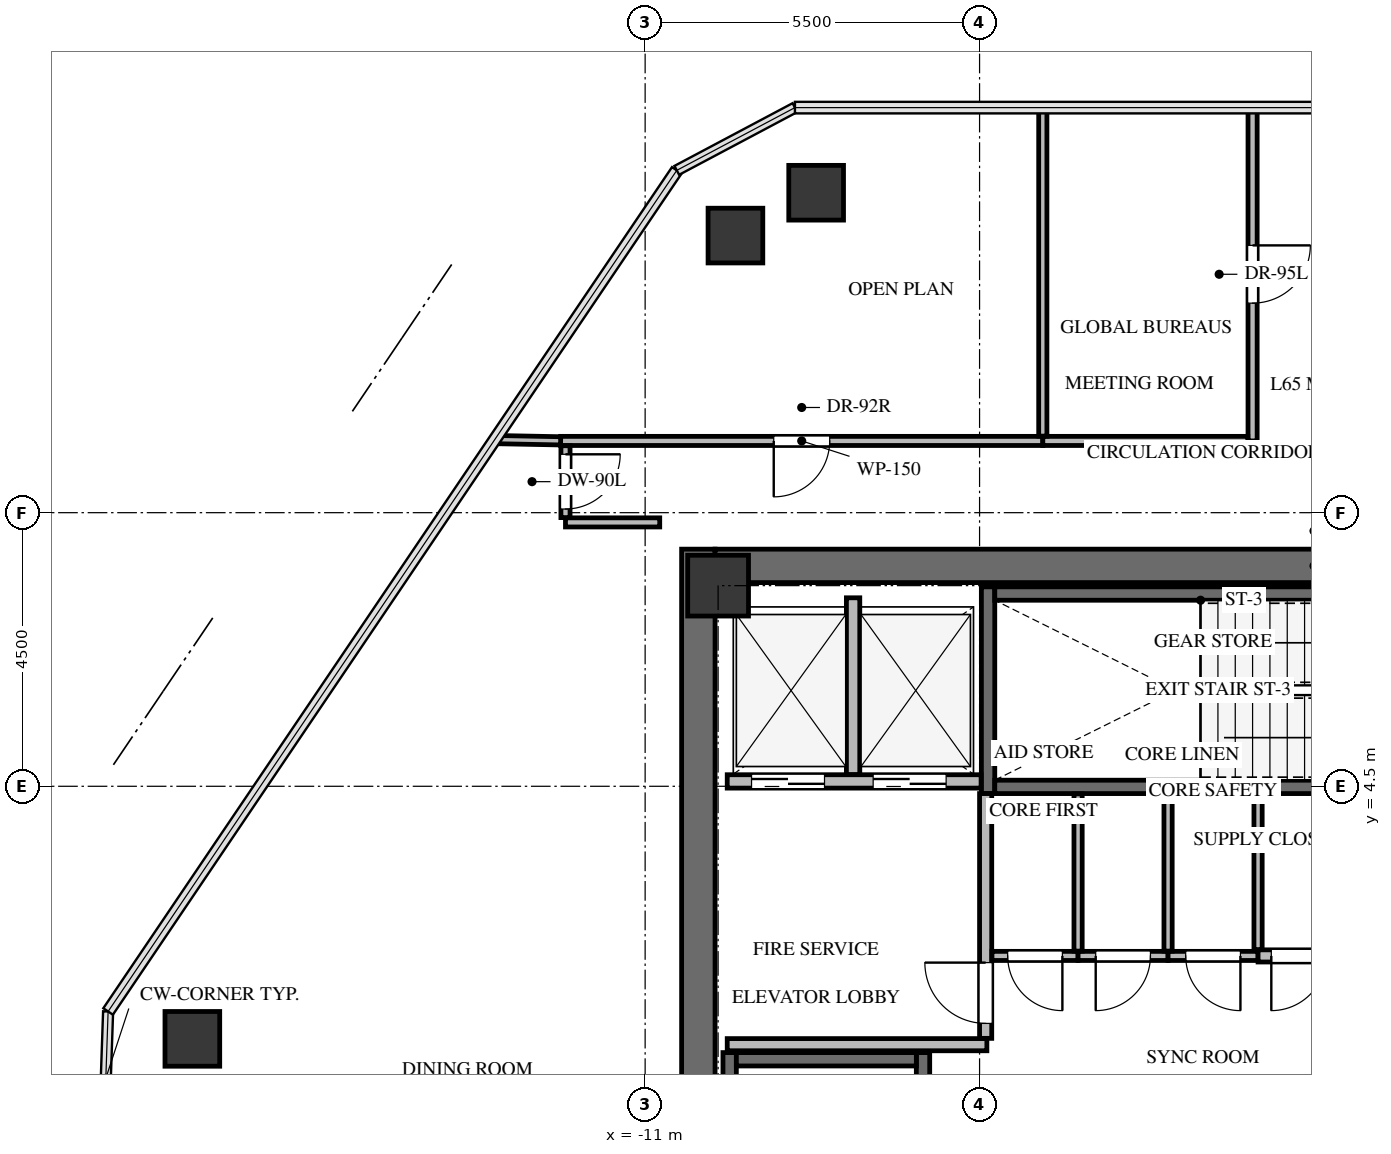
"""IFC4 building model, lengths in metres.
Left out: names, types, materials, properties, quantities, classifications, styles, units other than length and angle.
Written with IfcOpenShell. Run it as: python <this file> out.ifc"""

import sys

from ifc_helpers import new_model, si_unit, direction, frame, frame_2d, origin, origin_2d, place, context, subcontext, project, spatial, rectangle, extrude, source, transform, mapped, element, fill, save


model = new_model("IFC4")
c1 = context("Model", 3, precision=1e-05, world=origin(), true_north=direction((0.0, 1.0)))
c2 = subcontext(c1, "Body", "Model", "MODEL_VIEW")
j1 = project(units=[si_unit("LENGTHUNIT", "METRE"), si_unit("PLANEANGLEUNIT", "RADIAN")], contexts=[c1])
p1 = place(None, origin())
s1 = spatial("IfcSite", under=j1, at=p1, CompositionType="ELEMENT")
p2 = place(p1, origin())
s2 = spatial("IfcBuilding", under=s1, at=p2, CompositionType="ELEMENT")
p3 = place(p2, frame((0.0, 0.0, 234.8)))
s3 = spatial("IfcBuildingStorey", under=s2, at=p3, CompositionType="ELEMENT", Elevation=234.8)
p4 = place(p3, frame((-10.125, -8.4, 0.0), z_axis=(0.0, 0.0, 1.0), x_axis=(0.0, 1.0, 0.0)))
e1 = element("IfcWall", 1, at=p4, inside=s3, PredefinedType="SHEAR", context=c2, shape_type="SweptSolid", body=[
    extrude(rectangle(XDim=16.8, YDim=0.55, at=frame_2d((8.4, 0.0))), origin(), (0.0, 0.0, 1.0), 3.3),
])
p5 = place(p3, frame((-9.85, 8.125, 0.0), z_axis=(0.0, 0.0, 1.0), x_axis=(1.0, 0.0, 0.0)))
e2 = element("IfcWall", 2, at=p5, inside=s3, PredefinedType="SHEAR", context=c2, shape_type="SweptSolid", body=[
    extrude(rectangle(XDim=19.7, YDim=0.55, at=frame_2d((9.85, 0.0))), origin(), (0.0, 0.0, 1.0), 3.3),
])
p6 = place(p3, frame((-6.43, -7.77, -0.24), z_axis=(0.0, 0.0, 1.0), x_axis=(0.0, 1.0, 0.0)))
e3 = element("IfcWall", 3, at=p6, inside=s3, PredefinedType="SHEAR", context=c2, shape_type="SweptSolid", body=[
    extrude(rectangle(XDim=7.89, YDim=0.22, at=frame_2d((3.945, 0.0))), origin(), (0.0, 0.0, 1.0), 3.3),
])
p7 = place(p6, frame((6.32, 0.0, 0.0)))
e4 = element("IfcOpeningElement", 4, at=p7, cuts=e3, PredefinedType="OPENING", context=c2, shape_type="SweptSolid", body=[
    extrude(rectangle(XDim=1.05, YDim=2.15, at=frame_2d((0.525, 1.075))), frame((0.0, 0.12, 0.0), z_axis=(0.0, -1.0, 0.0), x_axis=(1.0, 0.0, 0.0)), (0.0, 0.0, 1.0), 0.24),
])
p8 = place(p3, frame((-9.61, 0.12, -0.24), z_axis=(0.0, 0.0, 1.0), x_axis=(0.0, -1.0, 0.0)))
e5 = element("IfcWall", 5, at=p8, inside=s3, PredefinedType="SHEAR", context=c2, shape_type="SweptSolid", body=[
    extrude(rectangle(XDim=7.89, YDim=0.22, at=frame_2d((3.945, 0.0))), origin(), (0.0, 0.0, 1.0), 3.3),
])
p9 = place(p3, frame((-6.54, 0.01, -0.24), z_axis=(0.0, 0.0, 1.0), x_axis=(-1.0, 0.0, 0.0)))
e6 = element("IfcWall", 6, at=p9, inside=s3, PredefinedType="SHEAR", context=c2, shape_type="SweptSolid", body=[
    extrude(rectangle(XDim=2.96, YDim=0.22, at=frame_2d((1.48, 0.0))), origin(), (0.0, 0.0, 1.0), 3.3),
])
p10 = place(p3, frame((-5.36, 7.78, -0.24), z_axis=(0.0, 0.0, 1.0), x_axis=(0.0, -1.0, 0.0)))
e7 = element("IfcWall", 7, at=p10, inside=s3, PredefinedType="SHEAR", context=c2, shape_type="SweptSolid", body=[
    extrude(rectangle(XDim=3.4, YDim=0.22, at=frame_2d((1.7, 0.0))), origin(), (0.0, 0.0, 1.0), 3.3),
])
p11 = place(p3, frame((-5.25, 4.49, -0.24), z_axis=(0.0, 0.0, 1.0), x_axis=(1.0, 0.0, 0.0)))
e8 = element("IfcWall", 8, at=p11, inside=s3, PredefinedType="SHEAR", context=c2, shape_type="SweptSolid", body=[
    extrude(rectangle(XDim=7.35, YDim=0.22, at=frame_2d((3.675, 0.0))), origin(), (0.0, 0.0, 1.0), 3.3),
])
p12 = place(p11, frame((5.85, 0.0, 0.0)))
e9 = element("IfcOpeningElement", 9, at=p12, cuts=e8, PredefinedType="OPENING", context=c2, shape_type="SweptSolid", body=[
    extrude(rectangle(XDim=1.05, YDim=2.15, at=frame_2d((0.525, 1.075))), frame((0.0, 0.12, 0.0), z_axis=(0.0, -1.0, 0.0), x_axis=(1.0, 0.0, 0.0)), (0.0, 0.0, 1.0), 0.24),
])
p13 = place(p3, frame((2.1, 7.67, -0.24), z_axis=(0.0, 0.0, 1.0), x_axis=(-1.0, 0.0, 0.0)))
e10 = element("IfcWall", 10, at=p13, inside=s3, PredefinedType="SHEAR", context=c2, shape_type="SweptSolid", body=[
    extrude(rectangle(XDim=7.35, YDim=0.22, at=frame_2d((3.675, 0.0))), origin(), (0.0, 0.0, 1.0), 3.3),
])
m1 = source(origin(), c2, "Body", "SweptSolid", [
    extrude(rectangle(XDim=1.0, YDim=1.0, at=origin_2d()), origin(), (0.0, 0.0, 1.0), 3.3),
])
p14 = place(p3, frame((-9.8, 7.8, -0.24), z_axis=(0.0, 0.0, 1.0), x_axis=(1.0, 0.0, 0.0)))
e11 = element("IfcColumn", 11, at=p14, inside=s3, PredefinedType="COLUMN", context=c2, shape_type="MappedRepresentation", body=[
    mapped(m1, transform((0.0, 0.0, 0.0), x_axis=(1.0, 0.0, 0.0), y_axis=(0.0, 1.0, 0.0), z_axis=(0.0, 0.0, 1.0), scale=1.0)),
])
m2 = source(origin(), c2, "Body", "SweptSolid", [
    extrude(rectangle(XDim=0.9, YDim=0.9, at=origin_2d()), origin(), (0.0, 0.0, 1.0), 3.3),
])
for number, where, z_axis, x_axis in (
    (12, (-18.446, 0.346, -0.24), (0.0, 0.0, 1.0), (1.0, 0.0, 0.0)),
    (13, (-9.515, 13.557, -0.24), (0.0, 0.0, 1.0), (1.0, 0.0, 0.0)),
    (14, (-8.188, 14.262, -0.24), (0.0, 0.0, 1.0), (1.0, 0.0, 0.0)),
):
    element("IfcColumn", number, at=place(p3, frame(where, z_axis=z_axis, x_axis=x_axis)), inside=s3, PredefinedType="COLUMN", context=c2, shape_type="MappedRepresentation", body=[
        mapped(m2, transform((0.0, 0.0, 0.0), x_axis=(1.0, 0.0, 0.0), y_axis=(0.0, 1.0, 0.0), z_axis=(0.0, 0.0, 1.0), scale=1.0)),
    ])
p15 = place(p3, frame((-9.65, 4.58, 0.0), z_axis=(0.0, 0.0, 1.0), x_axis=(1.0, 0.0, 0.0)))
e15 = element("IfcWall", 15, at=p15, inside=s3, PredefinedType="SOLIDWALL", context=c2, shape_type="SweptSolid", body=[
    extrude(rectangle(XDim=4.175, YDim=0.22, at=frame_2d((2.087, 0.0))), origin(), (0.0, 0.0, 1.0), 3.045),
])
p16 = place(p15, frame((0.4, 0.0, 0.0)))
e16 = element("IfcOpeningElement", 16, at=p16, cuts=e15, PredefinedType="OPENING", context=c2, shape_type="SweptSolid", body=[
    extrude(rectangle(XDim=1.2, YDim=2.15, at=frame_2d((0.6, 1.075))), frame((0.0, 0.12, 0.0), z_axis=(0.0, -1.0, 0.0), x_axis=(1.0, 0.0, 0.0)), (0.0, 0.0, 1.0), 0.24),
])
p17 = place(p15, frame((2.4, 0.0, 0.0)))
e17 = element("IfcOpeningElement", 17, at=p17, cuts=e15, PredefinedType="OPENING", context=c2, shape_type="SweptSolid", body=[
    extrude(rectangle(XDim=1.2, YDim=2.15, at=frame_2d((0.6, 1.075))), frame((0.0, 0.12, 0.0), z_axis=(0.0, -1.0, 0.0), x_axis=(1.0, 0.0, 0.0)), (0.0, 0.0, 1.0), 0.24),
])
p18 = place(p3, frame((-7.58, 4.694, 0.0), z_axis=(0.0, 0.0, 1.0), x_axis=(0.0, 1.0, 0.0)))
e18 = element("IfcWall", 18, at=p18, inside=s3, PredefinedType="SOLIDWALL", context=c2, shape_type="SweptSolid", body=[
    extrude(rectangle(XDim=2.906, YDim=0.22, at=frame_2d((1.453, 0.0))), origin(), (0.0, 0.0, 1.0), 3.045),
])
p19 = place(p3, frame((-9.65, 0.25, 0.0), z_axis=(0.0, 0.0, 1.0), x_axis=(1.0, 0.0, 0.0)))
e19 = element("IfcWall", 19, at=p19, inside=s3, PredefinedType="SOLIDWALL", context=c2, shape_type="SweptSolid", body=[
    extrude(rectangle(XDim=4.27, YDim=0.2, at=frame_2d((2.135, 0.0))), origin(), (0.0, 0.0, 1.0), 3.045),
])
p20 = place(p3, frame((-5.4, 0.354, 0.0), z_axis=(0.0, 0.0, 1.0), x_axis=(0.0, 1.0, 0.0)))
e20 = element("IfcWall", 20, at=p20, inside=s3, PredefinedType="SOLIDWALL", context=c2, shape_type="SweptSolid", body=[
    extrude(rectangle(XDim=4.026, YDim=0.2, at=frame_2d((2.013, 0.0))), origin(), (0.0, 0.0, 1.0), 3.045),
])
p21 = place(p20, frame((0.246, 0.0, 0.0)))
e21 = element("IfcOpeningElement", 21, at=p21, cuts=e20, PredefinedType="OPENING", context=c2, shape_type="SweptSolid", body=[
    extrude(rectangle(XDim=1.0, YDim=2.15, at=frame_2d((0.5, 1.075))), frame((0.0, 0.11, 0.0), z_axis=(0.0, -1.0, 0.0), x_axis=(1.0, 0.0, 0.0)), (0.0, 0.0, 1.0), 0.22),
])
p22 = place(p3, frame((-3.88, 1.71, 0.0), z_axis=(0.0, 0.0, 1.0), x_axis=(-1.0, 0.0, 0.0)))
e22 = element("IfcWall", 22, at=p22, inside=s3, PredefinedType="PARTITIONING", context=c2, shape_type="SweptSolid", body=[
    extrude(rectangle(XDim=1.416, YDim=0.15, at=frame_2d((0.708, 0.0))), origin(), (0.0, 0.0, 1.0), 3.045),
])
p23 = place(p22, frame((0.258, 0.0, 0.0)))
e23 = element("IfcOpeningElement", 23, at=p23, cuts=e22, PredefinedType="OPENING", context=c2, shape_type="SweptSolid", body=[
    extrude(rectangle(XDim=0.9, YDim=2.05, at=frame_2d((0.45, 1.025))), frame((0.0, 0.085, 0.0), z_axis=(0.0, -1.0, 0.0), x_axis=(1.0, 0.0, 0.0)), (0.0, 0.0, 1.0), 0.17),
])
p24 = place(p3, frame((-2.4, 1.71, 0.0), z_axis=(0.0, 0.0, 1.0), x_axis=(-1.0, 0.0, 0.0)))
e24 = element("IfcWall", 24, at=p24, inside=s3, PredefinedType="PARTITIONING", context=c2, shape_type="SweptSolid", body=[
    extrude(rectangle(XDim=1.48, YDim=0.15, at=frame_2d((0.74, 0.0))), origin(), (0.0, 0.0, 1.0), 3.045),
])
p25 = place(p24, frame((0.29, 0.0, 0.0)))
e25 = element("IfcOpeningElement", 25, at=p25, cuts=e24, PredefinedType="OPENING", context=c2, shape_type="SweptSolid", body=[
    extrude(rectangle(XDim=0.9, YDim=2.05, at=frame_2d((0.45, 1.025))), frame((0.0, 0.085, 0.0), z_axis=(0.0, -1.0, 0.0), x_axis=(1.0, 0.0, 0.0)), (0.0, 0.0, 1.0), 0.17),
])
p26 = place(p3, frame((-0.92, 1.71, 0.0), z_axis=(0.0, 0.0, 1.0), x_axis=(-1.0, 0.0, 0.0)))
e26 = element("IfcWall", 26, at=p26, inside=s3, PredefinedType="PARTITIONING", context=c2, shape_type="SweptSolid", body=[
    extrude(rectangle(XDim=1.48, YDim=0.15, at=frame_2d((0.74, 0.0))), origin(), (0.0, 0.0, 1.0), 3.045),
])
p27 = place(p26, frame((0.29, 0.0, 0.0)))
e27 = element("IfcOpeningElement", 27, at=p27, cuts=e26, PredefinedType="OPENING", context=c2, shape_type="SweptSolid", body=[
    extrude(rectangle(XDim=0.9, YDim=2.05, at=frame_2d((0.45, 1.025))), frame((0.0, 0.085, 0.0), z_axis=(0.0, -1.0, 0.0), x_axis=(1.0, 0.0, 0.0)), (0.0, 0.0, 1.0), 0.17),
])
p28 = place(p3, frame((0.416, 1.71, 0.0), z_axis=(0.0, 0.0, 1.0), x_axis=(-1.0, 0.0, 0.0)))
e28 = element("IfcWall", 28, at=p28, inside=s3, PredefinedType="SOLIDWALL", context=c2, shape_type="SweptSolid", body=[
    extrude(rectangle(XDim=1.336, YDim=0.2, at=frame_2d((0.668, 0.0))), origin(), (0.0, 0.0, 1.0), 3.045),
])
p29 = place(p28, frame((0.218, 0.0, 0.0)))
e29 = element("IfcOpeningElement", 29, at=p29, cuts=e28, PredefinedType="OPENING", context=c2, shape_type="SweptSolid", body=[
    extrude(rectangle(XDim=0.9, YDim=2.05, at=frame_2d((0.45, 1.025))), frame((0.0, 0.11, 0.0), z_axis=(0.0, -1.0, 0.0), x_axis=(1.0, 0.0, 0.0)), (0.0, 0.0, 1.0), 0.22),
])
p30 = place(p3, frame((-4.46, 10.18, 0.0), z_axis=(0.0, 0.0, 1.0), x_axis=(-1.0, 0.0, 0.0)))
e30 = element("IfcWall", 30, at=p30, inside=s3, PredefinedType="PARTITIONING", context=c2, shape_type="SweptSolid", body=[
    extrude(rectangle(XDim=7.93, YDim=0.15, at=frame_2d((3.965, 0.0))), origin(), (0.0, 0.0, 1.0), 2.301),
])
p31 = place(p30, frame((3.505, 0.0, 0.0)))
e31 = element("IfcOpeningElement", 31, at=p31, cuts=e30, PredefinedType="OPENING", context=c2, shape_type="SweptSolid", body=[
    extrude(rectangle(XDim=0.92, YDim=2.1, at=frame_2d((0.46, 1.05))), frame((0.0, 0.085, 0.0), z_axis=(0.0, -1.0, 0.0), x_axis=(1.0, 0.0, 0.0)), (0.0, 0.0, 1.0), 0.17),
])
p32 = place(p3, frame((-1.01, 15.662, 0.0), z_axis=(0.0, 0.0, 1.0), x_axis=(0.0, -1.0, 0.0)))
e32 = element("IfcWall", 32, at=p32, inside=s3, PredefinedType="PARTITIONING", context=c2, shape_type="SweptSolid", body=[
    extrude(rectangle(XDim=5.482, YDim=0.15, at=frame_2d((2.741, 0.0))), origin(), (0.0, 0.0, 1.0), 2.399),
])
p33 = place(p32, frame((2.266, 0.0, 0.0)))
e33 = element("IfcOpeningElement", 33, at=p33, cuts=e32, PredefinedType="OPENING", context=c2, shape_type="SweptSolid", body=[
    extrude(rectangle(XDim=0.95, YDim=2.1, at=frame_2d((0.475, 1.05))), frame((0.0, 0.085, 0.0), z_axis=(0.0, -1.0, 0.0), x_axis=(1.0, 0.0, 0.0)), (0.0, 0.0, 1.0), 0.17),
])
p34 = place(p3, frame((-1.089, 10.18, 0.0), z_axis=(0.0, 0.0, 1.0), x_axis=(-1.0, 0.0, 0.0)))
e34 = element("IfcWall", 34, at=p34, inside=s3, PredefinedType="PARTITIONING", context=c2, shape_type="SweptSolid", body=[
    extrude(rectangle(XDim=3.371, YDim=0.15, at=frame_2d((1.686, 0.0))), origin(), (0.0, 0.0, 1.0), 3.045),
])
p35 = place(p3, frame((-12.31, 8.84, 0.0), z_axis=(0.0, 0.0, 1.0), x_axis=(1.0, 0.0, 0.0)))
e35 = element("IfcWall", 35, at=p35, inside=s3, PredefinedType="PARTITIONING", context=c2, shape_type="SweptSolid", body=[
    extrude(rectangle(XDim=1.55, YDim=0.15, at=frame_2d((0.775, 0.0))), origin(), (0.0, 0.0, 1.0), 3.045),
])
p36 = place(p3, frame((-12.31, 10.101, 0.0), z_axis=(0.0, 0.0, 1.0), x_axis=(0.0, -1.0, 0.0)))
e36 = element("IfcWall", 36, at=p36, inside=s3, PredefinedType="PARTITIONING", context=c2, shape_type="SweptSolid", body=[
    extrude(rectangle(XDim=1.182, YDim=0.15, at=frame_2d((0.591, 0.0))), origin(), (0.0, 0.0, 1.0), 2.399),
])
p37 = place(p36, frame((0.141, 0.0, 0.0)))
e37 = element("IfcOpeningElement", 37, at=p37, cuts=e36, PredefinedType="OPENING", context=c2, shape_type="SweptSolid", body=[
    extrude(rectangle(XDim=0.9, YDim=2.05, at=frame_2d((0.45, 1.025))), frame((0.0, 0.085, 0.0), z_axis=(0.0, -1.0, 0.0), x_axis=(1.0, 0.0, 0.0)), (0.0, 0.0, 1.0), 0.17),
])
for number, where, z_axis, x_axis in (
    (38, (-3.88, 4.375, 0.0), (0.0, 0.0, 1.0), (0.0, -1.0, 0.0)),
    (39, (-2.4, 4.375, 0.0), (0.0, 0.0, 1.0), (0.0, -1.0, 0.0)),
):
    element("IfcWall", number, at=place(p3, frame(where, z_axis=z_axis, x_axis=x_axis)), inside=s3, PredefinedType="PARTITIONING", context=c2, shape_type="SweptSolid", body=[
        extrude(rectangle(XDim=2.586, YDim=0.135, at=frame_2d((1.293, 0.0))), origin(), (0.0, 0.0, 1.0), 3.045),
    ])
p38 = place(p3, frame((-0.92, 4.375, 0.0), z_axis=(0.0, 0.0, 1.0), x_axis=(0.0, -1.0, 0.0)))
e40 = element("IfcWall", 40, at=p38, inside=s3, PredefinedType="PARTITIONING", context=c2, shape_type="SweptSolid", body=[
    extrude(rectangle(XDim=2.561, YDim=0.135, at=frame_2d((1.281, 0.0))), origin(), (0.0, 0.0, 1.0), 3.045),
])
p39 = place(p3, frame((-4.46, 15.662, 0.0), z_axis=(0.0, 0.0, 1.0), x_axis=(0.0, -1.0, 0.0)))
e41 = element("IfcWall", 41, at=p39, inside=s3, PredefinedType="PARTITIONING", context=c2, shape_type="SweptSolid", body=[
    extrude(rectangle(XDim=5.403, YDim=0.135, at=frame_2d((2.702, 0.0))), origin(), (0.0, 0.0, 1.0), 2.399),
])
p40 = place(p3, frame((-12.39, 10.181, 0.0), z_axis=(0.0, 0.0, 1.0), x_axis=(-0.999812128272, 0.019383192748, 0.0)))
e42 = element("IfcWall", 42, at=p40, inside=s3, PredefinedType="PARTITIONING", context=c2, shape_type="SweptSolid", body=[
    extrude(rectangle(XDim=1.083, YDim=0.135, at=frame_2d((0.542, 0.0))), origin(), (0.0, 0.0, 1.0), 3.045),
])
m3 = source(origin(), c2, "Body", "SweptSolid", [
    extrude(rectangle(XDim=1.2, YDim=2.15, at=frame_2d((0.6, 1.075))), frame((0.0, 0.025, 0.0), z_axis=(0.0, -1.0, 0.0), x_axis=(1.0, 0.0, 0.0)), (0.0, 0.0, 1.0), 0.05),
])
p41 = place(p16, origin())
e43 = element("IfcDoor", 43, at=p41, inside=s3, OperationType="DOUBLE_DOOR_SLIDING", PredefinedType="DOOR", context=c2, shape_type="MappedRepresentation", body=[
    mapped(m3, transform((0.0, 0.0, 0.0), x_axis=(1.0, 0.0, 0.0), y_axis=(0.0, 1.0, 0.0), z_axis=(0.0, 0.0, 1.0), scale=1.0)),
])
fill(e16, e43)
p42 = place(p17, origin())
e44 = element("IfcDoor", 44, at=p42, inside=s3, OperationType="DOUBLE_DOOR_SLIDING", PredefinedType="DOOR", context=c2, shape_type="MappedRepresentation", body=[
    mapped(m3, transform((0.0, 0.0, 0.0), x_axis=(1.0, 0.0, 0.0), y_axis=(0.0, 1.0, 0.0), z_axis=(0.0, 0.0, 1.0), scale=1.0)),
])
fill(e17, e44)
m4 = source(origin(), c2, "Body", "SweptSolid", [
    extrude(rectangle(XDim=1.0, YDim=2.15, at=frame_2d((0.5, 1.075))), frame((0.0, 0.025, 0.0), z_axis=(0.0, -1.0, 0.0), x_axis=(1.0, 0.0, 0.0)), (0.0, 0.0, 1.0), 0.05),
])
p43 = place(p21, origin())
e45 = element("IfcDoor", 45, at=p43, inside=s3, OperationType="SINGLE_SWING_RIGHT", PredefinedType="DOOR", context=c2, shape_type="MappedRepresentation", body=[
    mapped(m4, transform((0.0, 0.0, 0.0), x_axis=(1.0, 0.0, 0.0), y_axis=(0.0, 1.0, 0.0), z_axis=(0.0, 0.0, 1.0), scale=1.0)),
])
fill(e21, e45)
m5 = source(origin(), c2, "Body", "SweptSolid", [
    extrude(rectangle(XDim=0.9, YDim=2.05, at=frame_2d((0.45, 1.025))), frame((0.0, 0.025, 0.0), z_axis=(0.0, -1.0, 0.0), x_axis=(1.0, 0.0, 0.0)), (0.0, 0.0, 1.0), 0.05),
])
p44 = place(p23, origin())
e46 = element("IfcDoor", 46, at=p44, inside=s3, OperationType="SINGLE_SWING_LEFT", PredefinedType="DOOR", context=c2, shape_type="MappedRepresentation", body=[
    mapped(m5, transform((0.0, 0.0, 0.0), x_axis=(1.0, 0.0, 0.0), y_axis=(0.0, 1.0, 0.0), z_axis=(0.0, 0.0, 1.0), scale=1.0)),
])
fill(e23, e46)
m6 = source(origin(), c2, "Body", "SweptSolid", [
    extrude(rectangle(XDim=0.9, YDim=2.05, at=frame_2d((0.45, 1.025))), frame((0.0, 0.025, 0.0), z_axis=(0.0, -1.0, 0.0), x_axis=(1.0, 0.0, 0.0)), (0.0, 0.0, 1.0), 0.05),
])
p45 = place(p25, origin())
e47 = element("IfcDoor", 47, at=p45, inside=s3, OperationType="SINGLE_SWING_RIGHT", PredefinedType="DOOR", context=c2, shape_type="MappedRepresentation", body=[
    mapped(m6, transform((0.0, 0.0, 0.0), x_axis=(1.0, 0.0, 0.0), y_axis=(0.0, 1.0, 0.0), z_axis=(0.0, 0.0, 1.0), scale=1.0)),
])
fill(e25, e47)
p46 = place(p27, origin())
e48 = element("IfcDoor", 48, at=p46, inside=s3, OperationType="SINGLE_SWING_LEFT", PredefinedType="DOOR", context=c2, shape_type="MappedRepresentation", body=[
    mapped(m5, transform((0.0, 0.0, 0.0), x_axis=(1.0, 0.0, 0.0), y_axis=(0.0, 1.0, 0.0), z_axis=(0.0, 0.0, 1.0), scale=1.0)),
])
fill(e27, e48)
p47 = place(p29, origin())
e49 = element("IfcDoor", 49, at=p47, inside=s3, OperationType="SINGLE_SWING_RIGHT", PredefinedType="DOOR", context=c2, shape_type="MappedRepresentation", body=[
    mapped(m6, transform((0.0, 0.0, 0.0), x_axis=(1.0, 0.0, 0.0), y_axis=(0.0, 1.0, 0.0), z_axis=(0.0, 0.0, 1.0), scale=1.0)),
])
fill(e29, e49)
m7 = source(origin(), c2, "Body", "SweptSolid", [
    extrude(rectangle(XDim=0.92, YDim=2.1, at=frame_2d((0.46, 1.05))), frame((0.0, 0.025, 0.0), z_axis=(0.0, -1.0, 0.0), x_axis=(1.0, 0.0, 0.0)), (0.0, 0.0, 1.0), 0.05),
])
p48 = place(p31, origin())
e50 = element("IfcDoor", 50, at=p48, inside=s3, OperationType="SINGLE_SWING_RIGHT", PredefinedType="DOOR", context=c2, shape_type="MappedRepresentation", body=[
    mapped(m7, transform((0.0, 0.0, 0.0), x_axis=(1.0, 0.0, 0.0), y_axis=(0.0, 1.0, 0.0), z_axis=(0.0, 0.0, 1.0), scale=1.0)),
])
fill(e31, e50)
m8 = source(origin(), c2, "Body", "SweptSolid", [
    extrude(rectangle(XDim=0.95, YDim=2.1, at=frame_2d((0.475, 1.05))), frame((0.0, 0.025, 0.0), z_axis=(0.0, -1.0, 0.0), x_axis=(1.0, 0.0, 0.0)), (0.0, 0.0, 1.0), 0.05),
])
p49 = place(p33, origin())
e51 = element("IfcDoor", 51, at=p49, inside=s3, OperationType="SINGLE_SWING_LEFT", PredefinedType="DOOR", context=c2, shape_type="MappedRepresentation", body=[
    mapped(m8, transform((0.0, 0.0, 0.0), x_axis=(1.0, 0.0, 0.0), y_axis=(0.0, 1.0, 0.0), z_axis=(0.0, 0.0, 1.0), scale=1.0)),
])
fill(e33, e51)
m9 = source(origin(), c2, "Body", "SweptSolid", [
    extrude(rectangle(XDim=0.9, YDim=2.05, at=frame_2d((0.45, 1.025))), frame((0.0, 0.025, 0.0), z_axis=(0.0, -1.0, 0.0), x_axis=(1.0, 0.0, 0.0)), (0.0, 0.0, 1.0), 0.05),
])
p50 = place(p37, origin())
e52 = element("IfcDoor", 52, at=p50, inside=s3, OperationType="SINGLE_SWING_LEFT", PredefinedType="DOOR", context=c2, shape_type="MappedRepresentation", body=[
    mapped(m9, transform((0.0, 0.0, 0.0), x_axis=(1.0, 0.0, 0.0), y_axis=(0.0, 1.0, 0.0), z_axis=(0.0, 0.0, 1.0), scale=1.0)),
])
fill(e37, e52)
save(model, sys.argv[1])
